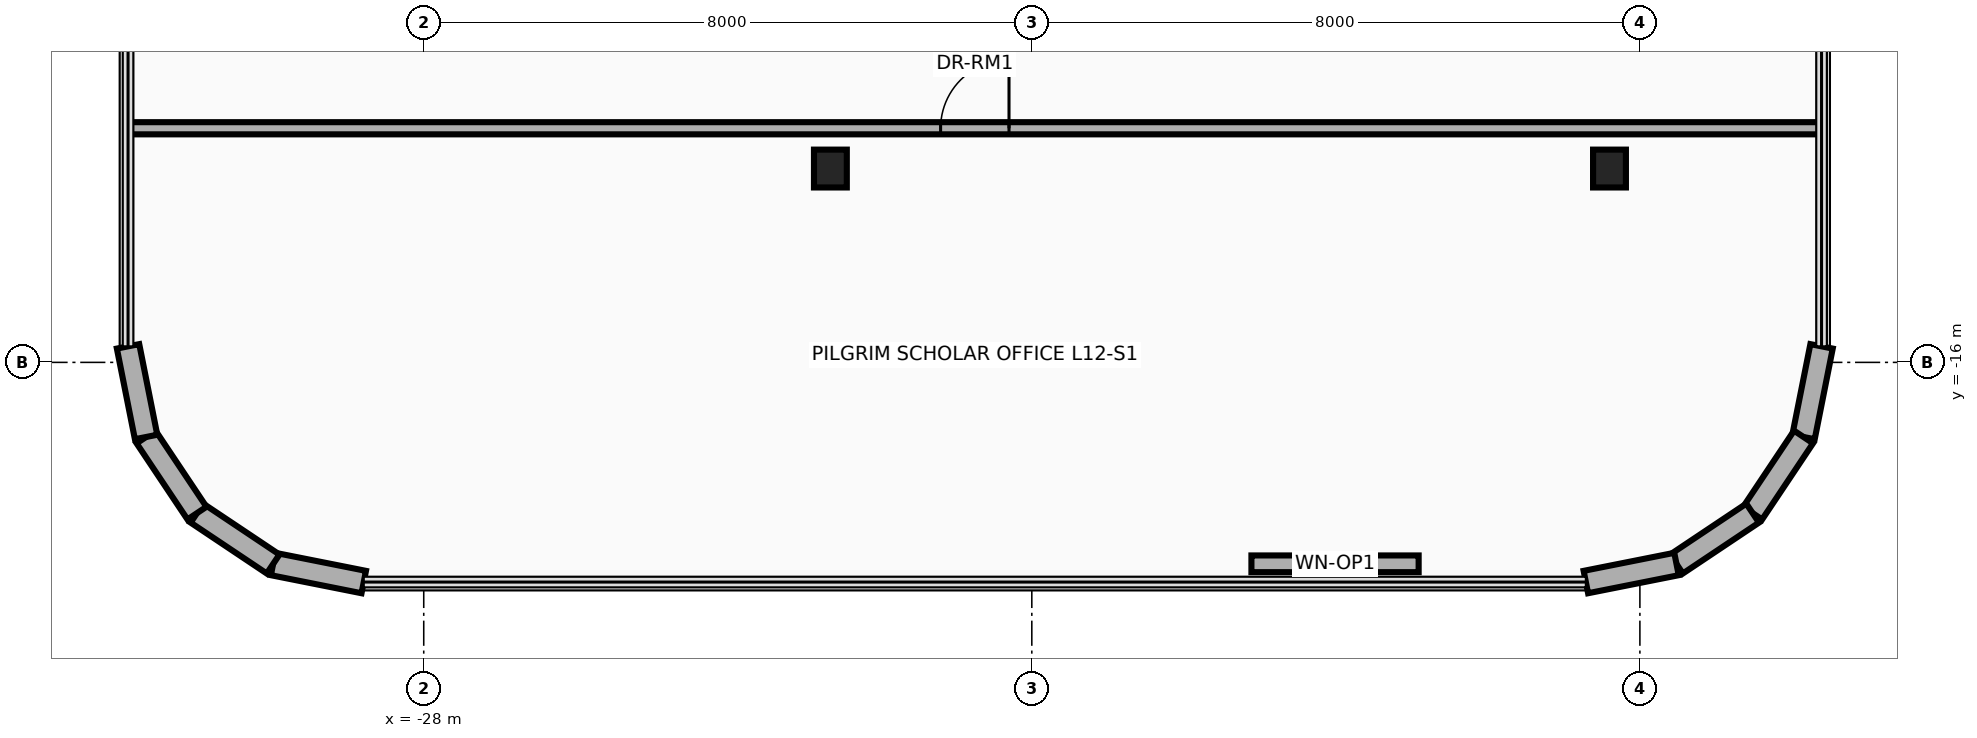
"""IFC4 building model, lengths in metres.
Left out: names, types, materials, properties, quantities, classifications, styles, units other than length and angle.
Written with IfcOpenShell. Run it as: python <this file> out.ifc"""

import sys

from ifc_helpers import new_model, si_unit, direction, frame, frame_2d, origin, origin_2d, place, context, subcontext, project, spatial, rectangle, i_section, extrude, source, transform, mapped, element, fill, save


model = new_model("IFC4")
c1 = context("Model", 3, precision=1e-05, world=origin(), true_north=direction((0.0, 1.0)))
c2 = subcontext(c1, "Body", "Model", "MODEL_VIEW")
j1 = project(units=[si_unit("LENGTHUNIT", "METRE"), si_unit("PLANEANGLEUNIT", "RADIAN")], contexts=[c1])
p1 = place(None, origin())
s1 = spatial("IfcSite", under=j1, at=p1, CompositionType="ELEMENT")
p2 = place(p1, origin())
s2 = spatial("IfcBuilding", under=s1, at=p2, CompositionType="ELEMENT")
p3 = place(p2, frame((0.0, 0.0, 51.9)))
s3 = spatial("IfcBuildingStorey", under=s2, at=p3, CompositionType="ELEMENT", Elevation=51.9)
m1 = source(origin(), c2, "Body", "SweptSolid", [
    extrude(i_section(OverallWidth=0.432, OverallDepth=0.498, WebThickness=0.056, FlangeThickness=0.089, at=origin_2d()), origin(), (0.0, 0.0, 1.0), 3.7),
])
for number, where, z_axis, x_axis in (
    (1, (-22.65, -13.45, 0.0), (0.0, 0.0, 1.0), (1.0, 0.0, 0.0)),
    (2, (-12.4, -13.45, 0.0), (0.0, 0.0, 1.0), (1.0, 0.0, 0.0)),
):
    element("IfcColumn", number, at=place(p3, frame(where, z_axis=z_axis, x_axis=x_axis)), inside=s3, PredefinedType="COLUMN", context=c2, shape_type="MappedRepresentation", body=[
        mapped(m1, transform((0.0, 0.0, 0.0), x_axis=(1.0, 0.0, 0.0), y_axis=(0.0, 1.0, 0.0), z_axis=(0.0, 0.0, 1.0), scale=1.0)),
    ])
p4 = place(p3, frame((-9.61, -15.789, 0.0), z_axis=(0.0, 0.0, 1.0), x_axis=(-0.194996050505, -0.980804027463, 0.0)))
e3 = element("IfcWall", 3, at=p4, inside=s3, PredefinedType="SOLIDWALL", context=c2, shape_type="SweptSolid", body=[
    extrude(rectangle(XDim=1.216, YDim=0.3, at=frame_2d((0.608, 0.0))), origin(), (0.0, 0.0, 1.0), 3.46),
])
for number, where, z_axis, x_axis in (
    (4, (-9.847, -16.982, 0.0), (0.0, 0.0, 1.0), (-0.556, -0.831, 0.0)),
    (5, (-10.517, -17.983, 0.0), (0.0, 0.0, 1.0), (-0.831, -0.556, 0.0)),
):
    element("IfcWall", number, at=place(p3, frame(where, z_axis=z_axis, x_axis=x_axis)), inside=s3, PredefinedType="SOLIDWALL", context=c2, shape_type="SweptSolid", body=[
        extrude(rectangle(XDim=1.205, YDim=0.3, at=frame_2d((0.603, 0.0))), origin(), (0.0, 0.0, 1.0), 3.46),
    ])
p5 = place(p3, frame((-11.518, -18.653, 0.0), z_axis=(0.0, 0.0, 1.0), x_axis=(-0.980804027463, -0.194996050505, 0.0)))
e6 = element("IfcWall", 6, at=p5, inside=s3, PredefinedType="SOLIDWALL", context=c2, shape_type="SweptSolid", body=[
    extrude(rectangle(XDim=1.216, YDim=0.3, at=frame_2d((0.608, 0.0))), origin(), (0.0, 0.0, 1.0), 3.46),
])
p6 = place(p3, frame((-14.911, -18.65, 0.0), z_axis=(0.0, 0.0, 1.0), x_axis=(-1.0, 0.0, 0.0)))
e7 = element("IfcWall", 7, at=p6, inside=s3, PredefinedType="SOLIDWALL", context=c2, shape_type="SweptSolid", body=[
    extrude(rectangle(XDim=2.2, YDim=0.22, at=frame_2d((1.1, 0.0))), origin(), (0.0, 0.0, 1.0), 3.46),
])
p7 = place(p6, frame((0.65, 0.0, 0.95)))
e8 = element("IfcOpeningElement", 8, at=p7, cuts=e7, PredefinedType="OPENING", context=c2, shape_type="SweptSolid", body=[
    extrude(rectangle(XDim=0.9, YDim=1.3, at=frame_2d((0.45, 0.65))), frame((0.0, 0.125, 0.0), z_axis=(0.0, -1.0, 0.0), x_axis=(1.0, 0.0, 0.0)), (0.0, 0.0, 1.0), 0.25),
])
p8 = place(p3, frame((-28.789, -18.89, 0.0), z_axis=(0.0, 0.0, 1.0), x_axis=(-0.980804027463, 0.194996050505, 0.0)))
e9 = element("IfcWall", 9, at=p8, inside=s3, PredefinedType="SOLIDWALL", context=c2, shape_type="SweptSolid", body=[
    extrude(rectangle(XDim=1.216, YDim=0.3, at=frame_2d((0.608, 0.0))), origin(), (0.0, 0.0, 1.0), 3.46),
])
for number, where, z_axis, x_axis in (
    (10, (-29.982, -18.653, 0.0), (0.0, 0.0, 1.0), (-0.831, 0.556, 0.0)),
    (11, (-30.983, -17.983, 0.0), (0.0, 0.0, 1.0), (-0.556, 0.831, 0.0)),
):
    element("IfcWall", number, at=place(p3, frame(where, z_axis=z_axis, x_axis=x_axis)), inside=s3, PredefinedType="SOLIDWALL", context=c2, shape_type="SweptSolid", body=[
        extrude(rectangle(XDim=1.205, YDim=0.3, at=frame_2d((0.603, 0.0))), origin(), (0.0, 0.0, 1.0), 3.46),
    ])
p9 = place(p3, frame((-31.653, -16.982, 0.0), z_axis=(0.0, 0.0, 1.0), x_axis=(-0.194996050505, 0.980804027463, 0.0)))
e12 = element("IfcWall", 12, at=p9, inside=s3, PredefinedType="SOLIDWALL", context=c2, shape_type="SweptSolid", body=[
    extrude(rectangle(XDim=1.216, YDim=0.3, at=frame_2d((0.608, 0.0))), origin(), (0.0, 0.0, 1.0), 3.46),
])
p10 = place(p3, frame((-31.89, -12.92, 0.0), z_axis=(0.0, 0.0, 1.0), x_axis=(1.0, 0.0, 0.0)))
e13 = element("IfcWall", 13, at=p10, inside=s3, PredefinedType="PARTITIONING", context=c2, shape_type="SweptSolid", body=[
    extrude(rectangle(XDim=22.28, YDim=0.16, at=frame_2d((11.14, 0.0))), origin(), (0.0, 0.0, 1.0), 2.834),
])
p11 = place(p10, frame((10.69, 0.0, 0.0)))
e14 = element("IfcOpeningElement", 14, at=p11, cuts=e13, PredefinedType="OPENING", context=c2, shape_type="SweptSolid", body=[
    extrude(rectangle(XDim=0.9, YDim=2.1, at=frame_2d((0.45, 1.05))), frame((0.0, 0.095, 0.0), z_axis=(0.0, -1.0, 0.0), x_axis=(1.0, 0.0, 0.0)), (0.0, 0.0, 1.0), 0.19),
])
p12 = place(p7, origin())
e15 = element("IfcWindow", 15, at=p12, inside=s3, PartitioningType="SINGLE_PANEL", PredefinedType="WINDOW", context=c2, shape_type="SweptSolid", body=[
    extrude(rectangle(XDim=0.9, YDim=1.3, at=frame_2d((0.45, 0.65))), frame((0.0, 0.03, 0.0), z_axis=(0.0, -1.0, 0.0), x_axis=(1.0, 0.0, 0.0)), (0.0, 0.0, 1.0), 0.06),
])
fill(e8, e15)
p13 = place(p11, origin())
e16 = element("IfcDoor", 16, at=p13, inside=s3, OperationType="SINGLE_SWING_RIGHT", PredefinedType="DOOR", context=c2, shape_type="SweptSolid", body=[
    extrude(rectangle(XDim=0.9, YDim=2.1, at=frame_2d((0.45, 1.05))), frame((0.0, 0.025, 0.0), z_axis=(0.0, -1.0, 0.0), x_axis=(1.0, 0.0, 0.0)), (0.0, 0.0, 1.0), 0.05),
])
fill(e14, e16)
save(model, sys.argv[1])
